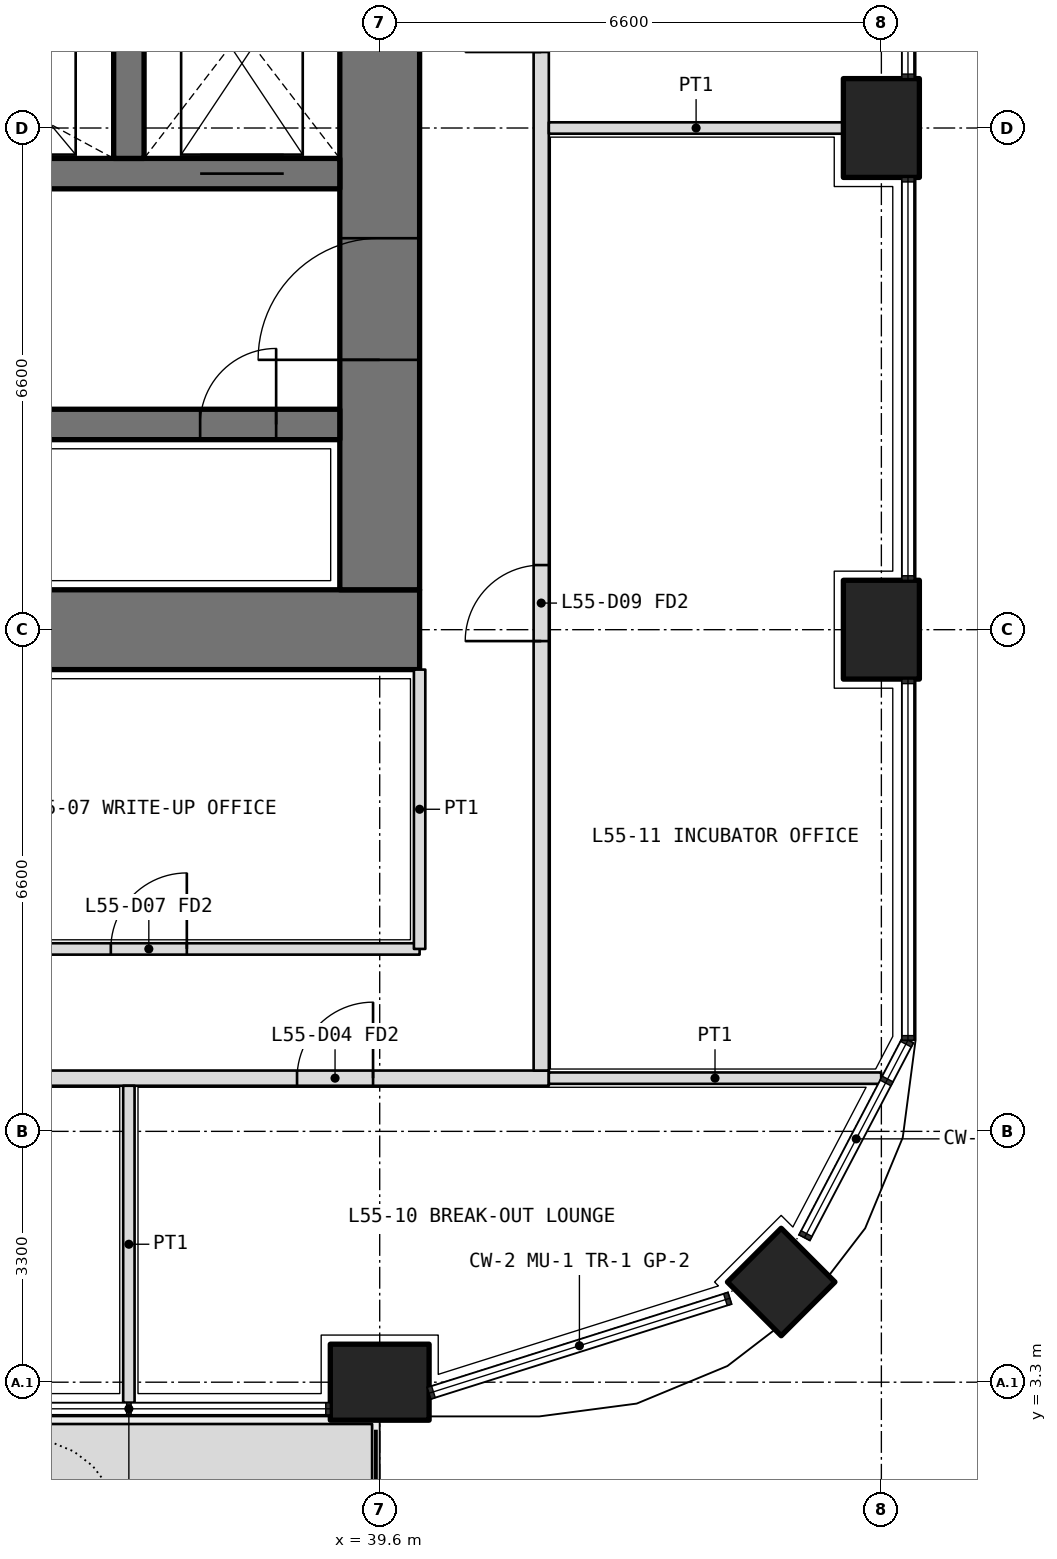
"""IFC4 building model, lengths in metres.
Left out: names, types, materials, properties, quantities, classifications, styles, units other than length and angle.
Written with IfcOpenShell. Run it as: python <this file> out.ifc"""

import sys

from ifc_helpers import new_model, si_unit, direction, frame, frame_2d, origin, origin_2d, place, context, subcontext, project, spatial, polyline, rectangle, outline, extrude, element, fill, save


model = new_model("IFC4")
c1 = context("Model", 3, precision=1e-05, world=origin(), true_north=direction((0.0, 1.0)))
c2 = subcontext(c1, "Body", "Model", "MODEL_VIEW")
j1 = project(units=[si_unit("LENGTHUNIT", "METRE"), si_unit("PLANEANGLEUNIT", "RADIAN")], contexts=[c1])
p1 = place(None, origin())
s1 = spatial("IfcSite", under=j1, at=p1, CompositionType="ELEMENT")
p2 = place(p1, origin())
s2 = spatial("IfcBuilding", under=s1, at=p2, CompositionType="ELEMENT")
p3 = place(p2, frame((0.0, 0.0, 241.8)))
s3 = spatial("IfcBuildingStorey", under=s2, at=p3, CompositionType="ELEMENT", Elevation=241.8)
p4 = place(p3, frame((44.882, 4.618, 0.0), z_axis=(0.0, 0.0, 1.0), x_axis=(0.707106781187, 0.707106781187, 0.0)))
e1 = element("IfcColumn", 1, at=p4, inside=s3, PredefinedType="COLUMN", context=c2, shape_type="SweptSolid", body=[
    extrude(rectangle(XDim=1.0, YDim=1.0, at=origin_2d()), origin(), (0.0, 0.0, 1.0), 4.2),
])
for number, where, z_axis, x_axis in (
    (2, (39.6, 3.3, 0.0), (0.0, 0.0, 1.0), (1.0, 0.0, 0.0)),
    (3, (46.2, 13.2, 0.0), (0.0, 0.0, 1.0), (0.0, 1.0, 0.0)),
    (4, (46.2, 19.8, 0.0), (0.0, 0.0, 1.0), (0.0, 1.0, 0.0)),
):
    element("IfcColumn", number, at=place(p3, frame(where, z_axis=z_axis, x_axis=x_axis)), inside=s3, PredefinedType="COLUMN", context=c2, shape_type="SweptSolid", body=[
        extrude(rectangle(XDim=1.3, YDim=1.0, at=origin_2d()), origin(), (0.0, 0.0, 1.0), 4.2),
    ])
p5 = place(p3, origin())
e5 = element("IfcWall", 5, at=p5, inside=s3, PredefinedType="USERDEFINED", context=c2, shape_type="SweptSolid", body=[
    extrude(outline(polyline([(30.45, 1.75), (39.5, 1.75), (39.5, 2.75), (30.45, 2.75), (30.45, 1.75)]), holes=[polyline([(30.6, 1.9), (39.35, 1.9), (39.35, 2.6), (30.6, 2.6), (30.6, 1.9)])]), origin(), (0.0, 0.0, 1.0), 1.05),
])
p6 = place(p3, frame((12.675, 13.2, 0.0), z_axis=(0.0, 0.0, 1.0), x_axis=(1.0, 0.0, 0.0)))
e6 = element("IfcWall", 6, at=p6, inside=s3, PredefinedType="SHEAR", context=c2, shape_type="SweptSolid", body=[
    extrude(rectangle(XDim=27.45, YDim=1.05, at=frame_2d((13.725, 0.0))), origin(), (0.0, 0.0, 1.0), 4.2),
])
p7 = place(p3, frame((39.6, 13.725, 0.0), z_axis=(0.0, 0.0, 1.0), x_axis=(0.0, 1.0, 0.0)))
e7 = element("IfcWall", 7, at=p7, inside=s3, PredefinedType="SHEAR", context=c2, shape_type="SweptSolid", body=[
    extrude(rectangle(XDim=18.75, YDim=1.05, at=frame_2d((9.375, 0.0))), origin(), (0.0, 0.0, 1.0), 4.2),
])
p8 = place(p7, frame((3.025, 0.0, 0.0)))
e8 = element("IfcOpeningElement", 8, at=p8, cuts=e7, PredefinedType="OPENING", context=c2, shape_type="SweptSolid", body=[
    extrude(rectangle(XDim=1.6, YDim=2.1, at=frame_2d((0.8, 1.05))), frame((0.0, 0.535, 0.0), z_axis=(0.0, -1.0, 0.0), x_axis=(1.0, 0.0, 0.0)), (0.0, 0.0, 1.0), 1.07),
])
p9 = place(p7, frame((13.825, 0.0, 0.0)))
e9 = element("IfcOpeningElement", 9, at=p9, cuts=e7, PredefinedType="OPENING", context=c2, shape_type="SweptSolid", body=[
    extrude(rectangle(XDim=1.6, YDim=2.1, at=frame_2d((0.8, 1.05))), frame((0.0, 0.535, 0.0), z_axis=(0.0, -1.0, 0.0), x_axis=(1.0, 0.0, 0.0)), (0.0, 0.0, 1.0), 1.07),
])
p10 = place(p3, frame((13.725, 15.9, 0.0), z_axis=(0.0, 0.0, 1.0), x_axis=(1.0, 0.0, 0.0)))
e10 = element("IfcWall", 10, at=p10, inside=s3, PredefinedType="SHEAR", context=c2, shape_type="SweptSolid", body=[
    extrude(rectangle(XDim=25.35, YDim=0.4, at=frame_2d((12.675, 0.0))), origin(), (0.0, 0.0, 1.0), 4.2),
])
p11 = place(p10, frame((0.837, 0.0, 0.0)))
e11 = element("IfcOpeningElement", 11, at=p11, cuts=e10, PredefinedType="OPENING", context=c2, shape_type="SweptSolid", body=[
    extrude(rectangle(XDim=1.0, YDim=2.1, at=frame_2d((0.5, 1.05))), frame((0.0, 0.21, 0.0), z_axis=(0.0, -1.0, 0.0), x_axis=(1.0, 0.0, 0.0)), (0.0, 0.0, 1.0), 0.42),
])
p12 = place(p10, frame((3.925, 0.0, 0.0)))
e12 = element("IfcOpeningElement", 12, at=p12, cuts=e10, PredefinedType="OPENING", context=c2, shape_type="SweptSolid", body=[
    extrude(rectangle(XDim=1.0, YDim=2.1, at=frame_2d((0.5, 1.05))), frame((0.0, 0.21, 0.0), z_axis=(0.0, -1.0, 0.0), x_axis=(1.0, 0.0, 0.0)), (0.0, 0.0, 1.0), 0.42),
])
p13 = place(p10, frame((7.225, 0.0, 0.0)))
e13 = element("IfcOpeningElement", 13, at=p13, cuts=e10, PredefinedType="OPENING", context=c2, shape_type="SweptSolid", body=[
    extrude(rectangle(XDim=1.0, YDim=2.1, at=frame_2d((0.5, 1.05))), frame((0.0, 0.21, 0.0), z_axis=(0.0, -1.0, 0.0), x_axis=(1.0, 0.0, 0.0)), (0.0, 0.0, 1.0), 0.42),
])
p14 = place(p10, frame((10.525, 0.0, 0.0)))
e14 = element("IfcOpeningElement", 14, at=p14, cuts=e10, PredefinedType="OPENING", context=c2, shape_type="SweptSolid", body=[
    extrude(rectangle(XDim=1.0, YDim=2.1, at=frame_2d((0.5, 1.05))), frame((0.0, 0.21, 0.0), z_axis=(0.0, -1.0, 0.0), x_axis=(1.0, 0.0, 0.0)), (0.0, 0.0, 1.0), 0.42),
])
p15 = place(p10, frame((13.825, 0.0, 0.0)))
e15 = element("IfcOpeningElement", 15, at=p15, cuts=e10, PredefinedType="OPENING", context=c2, shape_type="SweptSolid", body=[
    extrude(rectangle(XDim=1.0, YDim=2.1, at=frame_2d((0.5, 1.05))), frame((0.0, 0.21, 0.0), z_axis=(0.0, -1.0, 0.0), x_axis=(1.0, 0.0, 0.0)), (0.0, 0.0, 1.0), 0.42),
])
p16 = place(p10, frame((17.125, 0.0, 0.0)))
e16 = element("IfcOpeningElement", 16, at=p16, cuts=e10, PredefinedType="OPENING", context=c2, shape_type="SweptSolid", body=[
    extrude(rectangle(XDim=1.0, YDim=2.1, at=frame_2d((0.5, 1.05))), frame((0.0, 0.21, 0.0), z_axis=(0.0, -1.0, 0.0), x_axis=(1.0, 0.0, 0.0)), (0.0, 0.0, 1.0), 0.42),
])
p17 = place(p10, frame((20.425, 0.0, 0.0)))
e17 = element("IfcOpeningElement", 17, at=p17, cuts=e10, PredefinedType="OPENING", context=c2, shape_type="SweptSolid", body=[
    extrude(rectangle(XDim=1.0, YDim=2.1, at=frame_2d((0.5, 1.05))), frame((0.0, 0.21, 0.0), z_axis=(0.0, -1.0, 0.0), x_axis=(1.0, 0.0, 0.0)), (0.0, 0.0, 1.0), 0.42),
])
p18 = place(p10, frame((23.512, 0.0, 0.0)))
e18 = element("IfcOpeningElement", 18, at=p18, cuts=e10, PredefinedType="OPENING", context=c2, shape_type="SweptSolid", body=[
    extrude(rectangle(XDim=1.0, YDim=2.1, at=frame_2d((0.5, 1.05))), frame((0.0, 0.21, 0.0), z_axis=(0.0, -1.0, 0.0), x_axis=(1.0, 0.0, 0.0)), (0.0, 0.0, 1.0), 0.42),
])
p19 = place(p3, frame((13.725, 19.2, 0.0), z_axis=(0.0, 0.0, 1.0), x_axis=(1.0, 0.0, 0.0)))
e19 = element("IfcWall", 19, at=p19, inside=s3, PredefinedType="SHEAR", context=c2, shape_type="SweptSolid", body=[
    extrude(rectangle(XDim=25.35, YDim=0.4, at=frame_2d((12.675, 0.0))), origin(), (0.0, 0.0, 1.0), 4.2),
])
p20 = place(p19, frame((10.575, 0.0, 0.0)))
e20 = element("IfcOpeningElement", 20, at=p20, cuts=e19, PredefinedType="OPENING", context=c2, shape_type="SweptSolid", body=[
    extrude(rectangle(XDim=0.9, YDim=2.1, at=frame_2d((0.45, 1.05))), frame((0.0, 0.21, 0.0), z_axis=(0.0, -1.0, 0.0), x_axis=(1.0, 0.0, 0.0)), (0.0, 0.0, 1.0), 0.42),
])
p21 = place(p19, frame((13.875, 0.0, 0.0)))
e21 = element("IfcOpeningElement", 21, at=p21, cuts=e19, PredefinedType="OPENING", context=c2, shape_type="SweptSolid", body=[
    extrude(rectangle(XDim=0.9, YDim=2.1, at=frame_2d((0.45, 1.05))), frame((0.0, 0.21, 0.0), z_axis=(0.0, -1.0, 0.0), x_axis=(1.0, 0.0, 0.0)), (0.0, 0.0, 1.0), 0.42),
])
p22 = place(p19, frame((0.2, 0.0, 0.0)))
e22 = element("IfcOpeningElement", 22, at=p22, cuts=e19, PredefinedType="OPENING", context=c2, shape_type="SweptSolid", body=[
    extrude(rectangle(XDim=1.2, YDim=2.1, at=frame_2d((0.6, 1.05))), frame((0.0, 0.21, 0.0), z_axis=(0.0, -1.0, 0.0), x_axis=(1.0, 0.0, 0.0)), (0.0, 0.0, 1.0), 0.42),
])
p23 = place(p19, frame((23.512, 0.0, 0.0)))
e23 = element("IfcOpeningElement", 23, at=p23, cuts=e19, PredefinedType="OPENING", context=c2, shape_type="SweptSolid", body=[
    extrude(rectangle(XDim=1.1, YDim=2.1, at=frame_2d((0.55, 1.05))), frame((0.0, 0.21, 0.0), z_axis=(0.0, -1.0, 0.0), x_axis=(1.0, 0.0, 0.0)), (0.0, 0.0, 1.0), 0.42),
])
p24 = place(p19, frame((17.125, 0.0, 0.0)))
e24 = element("IfcOpeningElement", 24, at=p24, cuts=e19, PredefinedType="OPENING", context=c2, shape_type="SweptSolid", body=[
    extrude(rectangle(XDim=1.1, YDim=2.1, at=frame_2d((0.55, 1.05))), frame((0.0, 0.21, 0.0), z_axis=(0.0, -1.0, 0.0), x_axis=(1.0, 0.0, 0.0)), (0.0, 0.0, 1.0), 0.42),
])
p25 = place(p19, frame((20.325, 0.0, 0.0)))
e25 = element("IfcOpeningElement", 25, at=p25, cuts=e19, PredefinedType="OPENING", context=c2, shape_type="SweptSolid", body=[
    extrude(rectangle(XDim=1.1, YDim=2.1, at=frame_2d((0.55, 1.05))), frame((0.0, 0.21, 0.0), z_axis=(0.0, -1.0, 0.0), x_axis=(1.0, 0.0, 0.0)), (0.0, 0.0, 1.0), 0.42),
])
p26 = place(p3, frame((36.3, 19.4, 0.0), z_axis=(0.0, 0.0, 1.0), x_axis=(0.0, 1.0, 0.0)))
e26 = element("IfcWall", 26, at=p26, inside=s3, PredefinedType="SHEAR", context=c2, shape_type="SweptSolid", body=[
    extrude(rectangle(XDim=3.35, YDim=0.4, at=frame_2d((1.675, 0.0))), origin(), (0.0, 0.0, 1.0), 4.2),
])
p27 = place(p3, frame((12.675, 9.0, 0.0), z_axis=(0.0, 0.0, 1.0), x_axis=(1.0, 0.0, 0.0)))
e27 = element("IfcWall", 27, at=p27, inside=s3, PredefinedType="PARTITIONING", context=c2, shape_type="SweptSolid", body=[
    extrude(rectangle(XDim=27.45, YDim=0.15, at=frame_2d((13.725, 0.0))), origin(), (0.0, 0.0, 1.0), 3.0),
])
p28 = place(p27, frame((3.062, 0.0, 0.0)))
e28 = element("IfcOpeningElement", 28, at=p28, cuts=e27, PredefinedType="OPENING", context=c2, shape_type="SweptSolid", body=[
    extrude(rectangle(XDim=1.0, YDim=2.1, at=frame_2d((0.5, 1.05))), frame((0.0, 0.085, 0.0), z_axis=(0.0, -1.0, 0.0), x_axis=(1.0, 0.0, 0.0)), (0.0, 0.0, 1.0), 0.17),
])
p29 = place(p27, frame((13.225, 0.0, 0.0)))
e29 = element("IfcOpeningElement", 29, at=p29, cuts=e27, PredefinedType="OPENING", context=c2, shape_type="SweptSolid", body=[
    extrude(rectangle(XDim=1.0, YDim=2.1, at=frame_2d((0.5, 1.05))), frame((0.0, 0.085, 0.0), z_axis=(0.0, -1.0, 0.0), x_axis=(1.0, 0.0, 0.0)), (0.0, 0.0, 1.0), 0.17),
])
p30 = place(p27, frame((23.387, 0.0, 0.0)))
e30 = element("IfcOpeningElement", 30, at=p30, cuts=e27, PredefinedType="OPENING", context=c2, shape_type="SweptSolid", body=[
    extrude(rectangle(XDim=1.0, YDim=2.1, at=frame_2d((0.5, 1.05))), frame((0.0, 0.085, 0.0), z_axis=(0.0, -1.0, 0.0), x_axis=(1.0, 0.0, 0.0)), (0.0, 0.0, 1.0), 0.17),
])
p31 = place(p3, frame((40.125, 12.675, 0.0), z_axis=(0.0, 0.0, 1.0), x_axis=(0.0, -1.0, 0.0)))
e31 = element("IfcWall", 31, at=p31, inside=s3, PredefinedType="PARTITIONING", context=c2, shape_type="SweptSolid", body=[
    extrude(rectangle(XDim=3.675, YDim=0.15, at=frame_2d((1.837, 0.0))), origin(), (0.0, 0.0, 1.0), 3.0),
])
p32 = place(p3, frame((10.975, 7.3, 0.0), z_axis=(0.0, 0.0, 1.0), x_axis=(1.0, 0.0, 0.0)))
e32 = element("IfcWall", 32, at=p32, inside=s3, PredefinedType="PARTITIONING", context=c2, shape_type="SweptSolid", body=[
    extrude(rectangle(XDim=30.85, YDim=0.2, at=frame_2d((15.425, 0.0))), origin(), (0.0, 0.0, 1.0), 3.0),
])
p33 = place(p32, frame((3.863, 0.0, 0.0)))
e33 = element("IfcOpeningElement", 33, at=p33, cuts=e32, PredefinedType="OPENING", context=c2, shape_type="SweptSolid", body=[
    extrude(rectangle(XDim=1.2, YDim=2.1, at=frame_2d((0.6, 1.05))), frame((0.0, 0.11, 0.0), z_axis=(0.0, -1.0, 0.0), x_axis=(1.0, 0.0, 0.0)), (0.0, 0.0, 1.0), 0.22),
])
p34 = place(p32, frame((16.575, 0.0, 0.0)))
e34 = element("IfcOpeningElement", 34, at=p34, cuts=e32, PredefinedType="OPENING", context=c2, shape_type="SweptSolid", body=[
    extrude(rectangle(XDim=1.0, YDim=2.1, at=frame_2d((0.5, 1.05))), frame((0.0, 0.11, 0.0), z_axis=(0.0, -1.0, 0.0), x_axis=(1.0, 0.0, 0.0)), (0.0, 0.0, 1.0), 0.22),
])
p35 = place(p32, frame((27.538, 0.0, 0.0)))
e35 = element("IfcOpeningElement", 35, at=p35, cuts=e32, PredefinedType="OPENING", context=c2, shape_type="SweptSolid", body=[
    extrude(rectangle(XDim=1.0, YDim=2.1, at=frame_2d((0.5, 1.05))), frame((0.0, 0.11, 0.0), z_axis=(0.0, -1.0, 0.0), x_axis=(1.0, 0.0, 0.0)), (0.0, 0.0, 1.0), 0.22),
])
p36 = place(p3, frame((41.725, 7.4, 0.0), z_axis=(0.0, 0.0, 1.0), x_axis=(0.0, 1.0, 0.0)))
e36 = element("IfcWall", 36, at=p36, inside=s3, PredefinedType="PARTITIONING", context=c2, shape_type="SweptSolid", body=[
    extrude(rectangle(XDim=31.4, YDim=0.2, at=frame_2d((15.7, 0.0))), origin(), (0.0, 0.0, 1.0), 3.0),
])
p37 = place(p36, frame((5.65, 0.0, 0.0)))
e37 = element("IfcOpeningElement", 37, at=p37, cuts=e36, PredefinedType="OPENING", context=c2, shape_type="SweptSolid", body=[
    extrude(rectangle(XDim=1.0, YDim=2.1, at=frame_2d((0.5, 1.05))), frame((0.0, 0.11, 0.0), z_axis=(0.0, -1.0, 0.0), x_axis=(1.0, 0.0, 0.0)), (0.0, 0.0, 1.0), 0.22),
])
p38 = place(p36, frame((13.4, 0.0, 0.0)))
e38 = element("IfcOpeningElement", 38, at=p38, cuts=e36, PredefinedType="OPENING", context=c2, shape_type="SweptSolid", body=[
    extrude(rectangle(XDim=1.0, YDim=2.1, at=frame_2d((0.5, 1.05))), frame((0.0, 0.11, 0.0), z_axis=(0.0, -1.0, 0.0), x_axis=(1.0, 0.0, 0.0)), (0.0, 0.0, 1.0), 0.22),
])
p39 = place(p36, frame((16.75, 0.0, 0.0)))
e39 = element("IfcOpeningElement", 39, at=p39, cuts=e36, PredefinedType="OPENING", context=c2, shape_type="SweptSolid", body=[
    extrude(rectangle(XDim=0.9, YDim=2.1, at=frame_2d((0.45, 1.05))), frame((0.0, 0.11, 0.0), z_axis=(0.0, -1.0, 0.0), x_axis=(1.0, 0.0, 0.0)), (0.0, 0.0, 1.0), 0.22),
])
p40 = place(p36, frame((21.8, 0.0, 0.0)))
e40 = element("IfcOpeningElement", 40, at=p40, cuts=e36, PredefinedType="OPENING", context=c2, shape_type="SweptSolid", body=[
    extrude(rectangle(XDim=1.0, YDim=2.1, at=frame_2d((0.5, 1.05))), frame((0.0, 0.11, 0.0), z_axis=(0.0, -1.0, 0.0), x_axis=(1.0, 0.0, 0.0)), (0.0, 0.0, 1.0), 0.22),
])
p41 = place(p36, frame((28.05, 0.0, 0.0)))
e41 = element("IfcOpeningElement", 41, at=p41, cuts=e36, PredefinedType="OPENING", context=c2, shape_type="SweptSolid", body=[
    extrude(rectangle(XDim=1.0, YDim=2.1, at=frame_2d((0.5, 1.05))), frame((0.0, 0.11, 0.0), z_axis=(0.0, -1.0, 0.0), x_axis=(1.0, 0.0, 0.0)), (0.0, 0.0, 1.0), 0.22),
])
p42 = place(p3, frame((46.198, 7.3, 0.0), z_axis=(0.0, 0.0, 1.0), x_axis=(-1.0, 0.0, 0.0)))
e42 = element("IfcWall", 42, at=p42, inside=s3, PredefinedType="PARTITIONING", context=c2, shape_type="SweptSolid", body=[
    extrude(rectangle(XDim=4.373, YDim=0.15, at=frame_2d((2.186, 0.0))), origin(), (0.0, 0.0, 1.0), 2.7),
])
p43 = place(p3, frame((36.3, 3.03, 0.0), z_axis=(0.0, 0.0, 1.0), x_axis=(0.0, 1.0, 0.0)))
e43 = element("IfcWall", 43, at=p43, inside=s3, PredefinedType="PARTITIONING", context=c2, shape_type="SweptSolid", body=[
    extrude(rectangle(XDim=4.17, YDim=0.15, at=frame_2d((2.085, 0.0))), origin(), (0.0, 0.0, 1.0), 2.7),
])
p44 = place(p3, frame((45.7, 19.8, 0.0), z_axis=(0.0, 0.0, 1.0), x_axis=(-1.0, 0.0, 0.0)))
e44 = element("IfcWall", 44, at=p44, inside=s3, PredefinedType="PARTITIONING", context=c2, shape_type="SweptSolid", body=[
    extrude(rectangle(XDim=3.875, YDim=0.15, at=frame_2d((1.938, 0.0))), origin(), (0.0, 0.0, 1.0), 3.0),
])
p45 = place(p30, origin())
e45 = element("IfcDoor", 45, at=p45, inside=s3, OperationType="SINGLE_SWING_RIGHT", PredefinedType="DOOR", context=c2, shape_type="SweptSolid", body=[
    extrude(rectangle(XDim=1.0, YDim=2.1, at=frame_2d((0.5, 1.05))), frame((0.0, 0.025, 0.0), z_axis=(0.0, -1.0, 0.0), x_axis=(1.0, 0.0, 0.0)), (0.0, 0.0, 1.0), 0.05),
])
fill(e30, e45)
p46 = place(p35, origin())
e46 = element("IfcDoor", 46, at=p46, inside=s3, OperationType="SINGLE_SWING_RIGHT", PredefinedType="DOOR", context=c2, shape_type="SweptSolid", body=[
    extrude(rectangle(XDim=1.0, YDim=2.1, at=frame_2d((0.5, 1.05))), frame((0.0, 0.025, 0.0), z_axis=(0.0, -1.0, 0.0), x_axis=(1.0, 0.0, 0.0)), (0.0, 0.0, 1.0), 0.05),
])
fill(e35, e46)
p47 = place(p37, origin())
e47 = element("IfcDoor", 47, at=p47, inside=s3, OperationType="SINGLE_SWING_LEFT", PredefinedType="DOOR", context=c2, shape_type="SweptSolid", body=[
    extrude(rectangle(XDim=1.0, YDim=2.1, at=frame_2d((0.5, 1.05))), frame((0.0, 0.025, 0.0), z_axis=(0.0, -1.0, 0.0), x_axis=(1.0, 0.0, 0.0)), (0.0, 0.0, 1.0), 0.05),
])
fill(e37, e47)
p48 = place(p38, origin())
e48 = element("IfcDoor", 48, at=p48, inside=s3, OperationType="SINGLE_SWING_LEFT", PredefinedType="DOOR", context=c2, shape_type="SweptSolid", body=[
    extrude(rectangle(XDim=1.0, YDim=2.1, at=frame_2d((0.5, 1.05))), frame((0.0, 0.025, 0.0), z_axis=(0.0, -1.0, 0.0), x_axis=(1.0, 0.0, 0.0)), (0.0, 0.0, 1.0), 0.05),
])
fill(e38, e48)
p49 = place(p18, origin())
e49 = element("IfcDoor", 49, at=p49, inside=s3, OperationType="SINGLE_SWING_RIGHT", PredefinedType="DOOR", context=c2, shape_type="SweptSolid", body=[
    extrude(rectangle(XDim=1.0, YDim=2.1, at=frame_2d((0.5, 1.05))), frame((0.0, 0.025, 0.0), z_axis=(0.0, -1.0, 0.0), x_axis=(1.0, 0.0, 0.0)), (0.0, 0.0, 1.0), 0.05),
])
fill(e18, e49)
p50 = place(p8, origin())
e50 = element("IfcDoor", 50, at=p50, inside=s3, OperationType="DOUBLE_DOOR_DOUBLE_SWING", PredefinedType="DOOR", context=c2, shape_type="SweptSolid", body=[
    extrude(rectangle(XDim=1.6, YDim=2.1, at=frame_2d((0.8, 1.05))), frame((0.0, 0.025, 0.0), z_axis=(0.0, -1.0, 0.0), x_axis=(1.0, 0.0, 0.0)), (0.0, 0.0, 1.0), 0.05),
])
fill(e8, e50)
p51 = place(p23, origin())
e51 = element("IfcDoor", 51, at=p51, inside=s3, OperationType="DOUBLE_DOOR_SLIDING", PredefinedType="DOOR", context=c2, shape_type="SweptSolid", body=[
    extrude(rectangle(XDim=1.1, YDim=2.1, at=frame_2d((0.55, 1.05))), frame((0.0, 0.025, 0.0), z_axis=(0.0, -1.0, 0.0), x_axis=(1.0, 0.0, 0.0)), (0.0, 0.0, 1.0), 0.05),
])
fill(e23, e51)
save(model, sys.argv[1])
